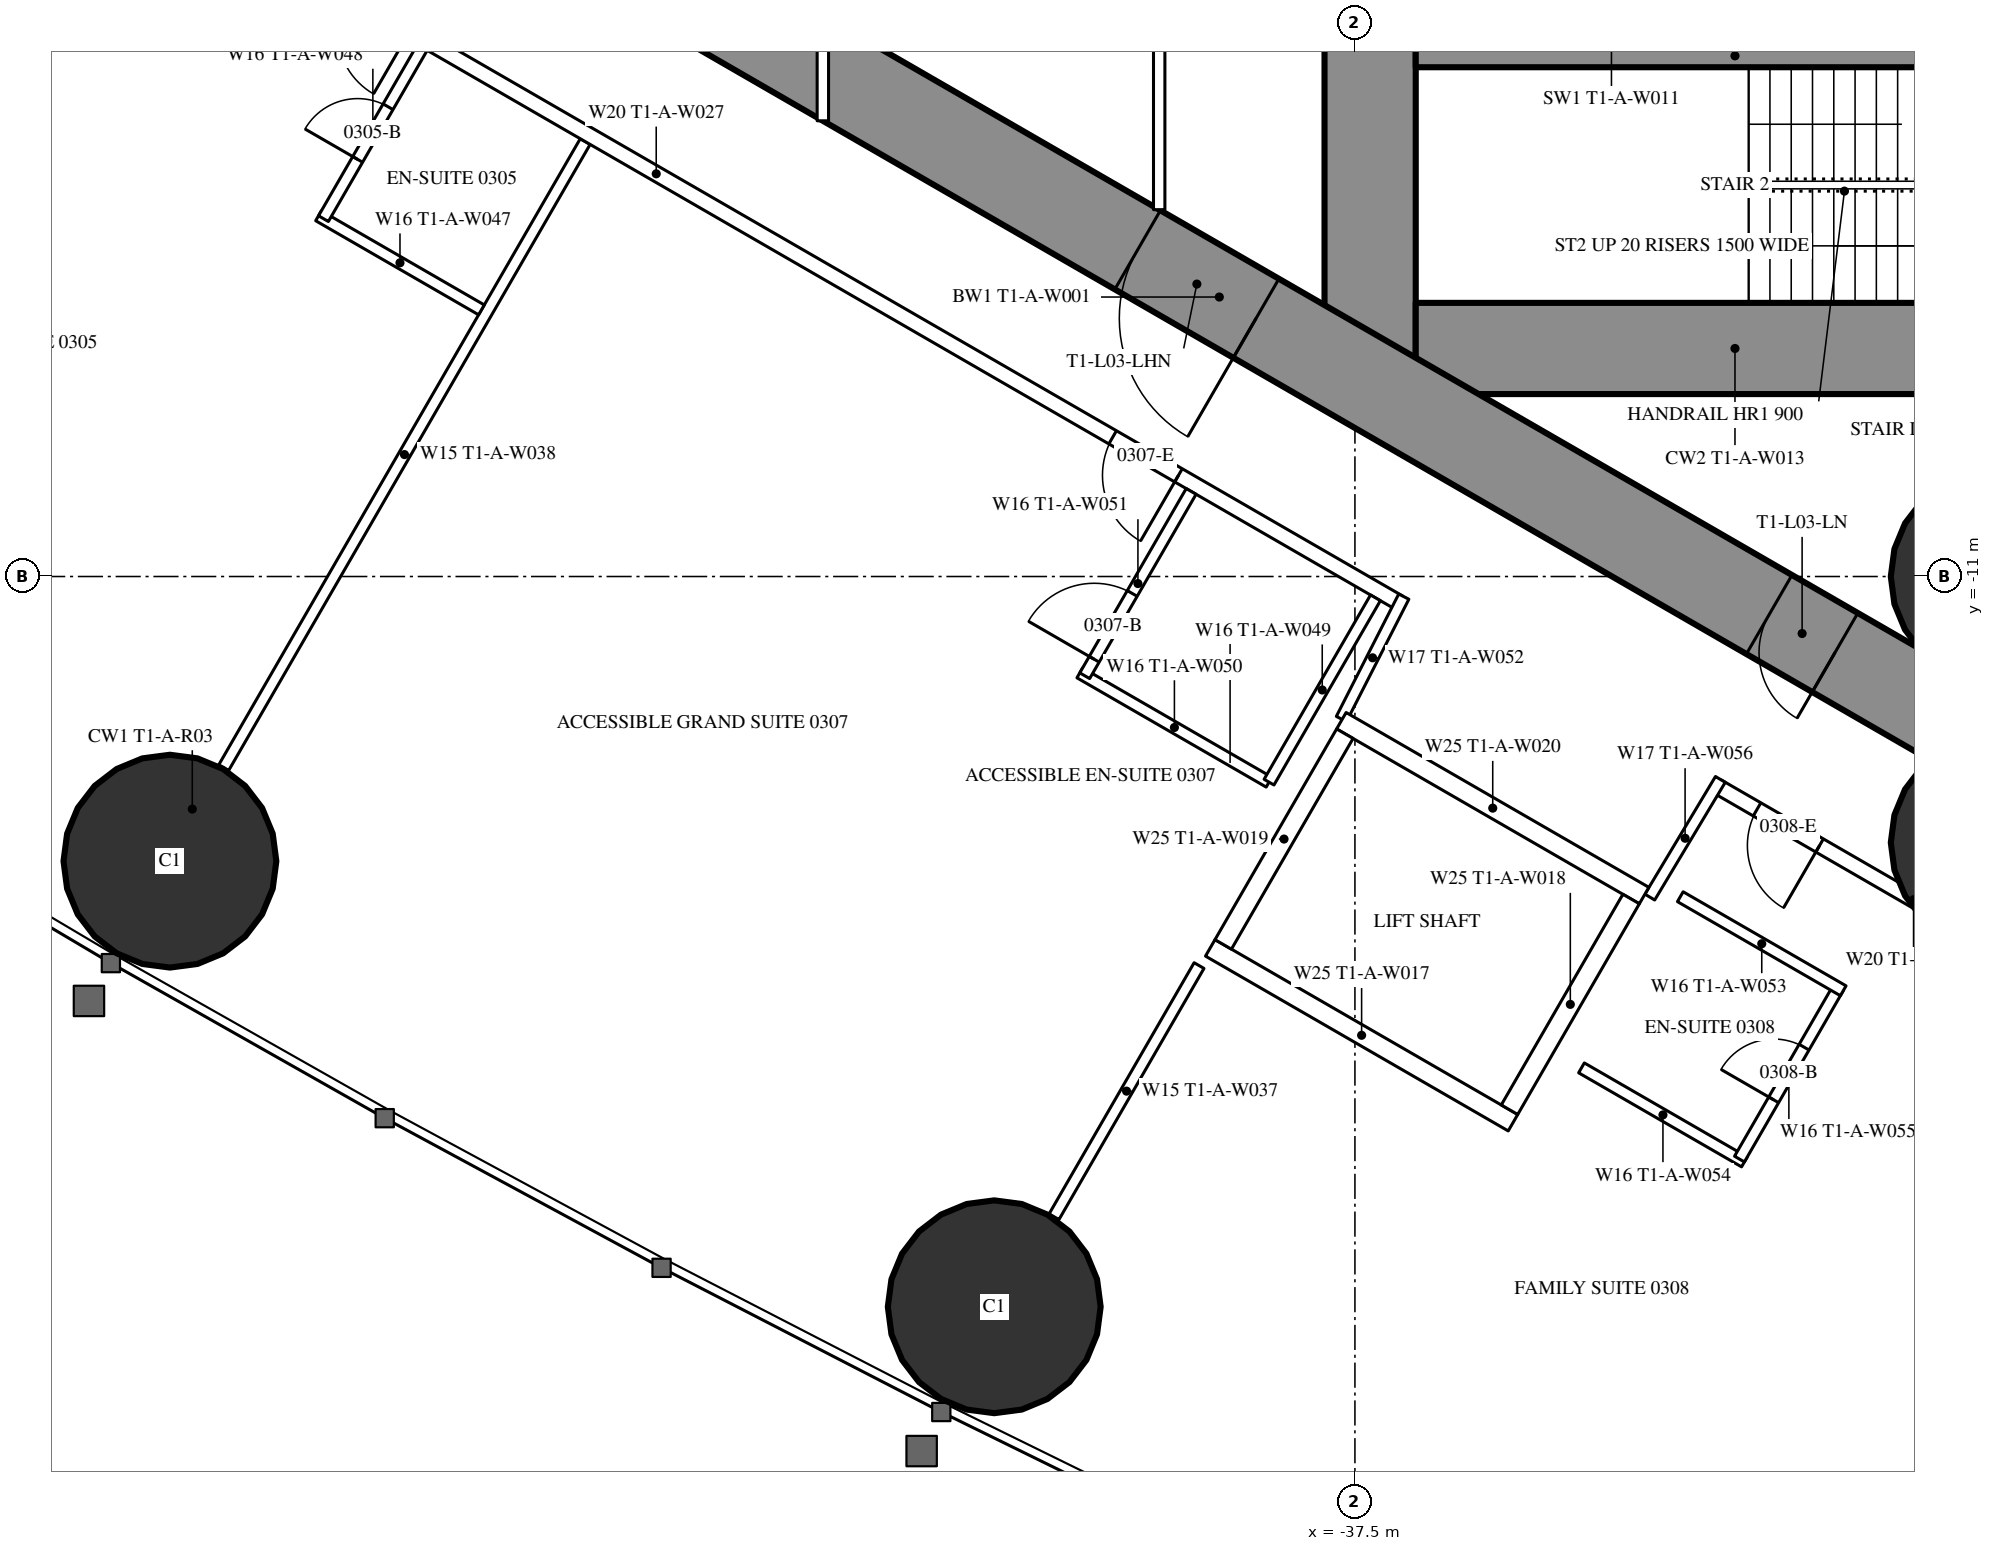
"""IFC4 building model, lengths in metres.
Left out: names, types, materials, properties, quantities, classifications, styles, units other than length and angle.
Written with IfcOpenShell. Run it as: python <this file> out.ifc"""

import sys

from ifc_helpers import new_model, si_unit, direction, frame, frame_2d, origin, origin_2d, place, context, subcontext, project, spatial, rectangle, hollow_circle, extrude, element, fill, save


model = new_model("IFC4")
c1 = context("Model", 3, precision=1e-05, world=origin(), true_north=direction((0.0, 1.0)))
c2 = subcontext(c1, "Body", "Model", "MODEL_VIEW")
j1 = project(units=[si_unit("LENGTHUNIT", "METRE"), si_unit("PLANEANGLEUNIT", "RADIAN")], contexts=[c1])
p1 = place(None, origin())
s1 = spatial("IfcSite", under=j1, at=p1, CompositionType="ELEMENT")
p2 = place(p1, origin())
s2 = spatial("IfcBuilding", under=s1, at=p2, CompositionType="ELEMENT")
p3 = place(p2, frame((0.0, 0.0, 18.0)))
s3 = spatial("IfcBuildingStorey", under=s2, at=p3, CompositionType="ELEMENT", Elevation=18.0)
for number, where, z_axis, x_axis in (
    (1, (-29.05, -11.0, 0.0), (0.0, 0.0, 1.0), (1.0, 0.0, 0.0)),
    (2, (-29.05, -14.5, 0.0), (0.0, 0.0, 1.0), (1.0, 0.0, 0.0)),
    (3, (-53.09, -14.745, 0.0), (0.0, 0.0, 1.0), (1.0, 0.0, 0.0)),
    (4, (-42.245, -20.607, 0.0), (0.0, 0.0, 1.0), (1.0, 0.0, 0.0)),
):
    element("IfcColumn", number, at=place(p3, frame(where, z_axis=z_axis, x_axis=x_axis)), inside=s3, PredefinedType="COLUMN", context=c2, shape_type="SweptSolid", body=[
        extrude(hollow_circle(Radius=1.4, WallThickness=0.12, at=origin_2d()), origin(), (0.0, 0.0, 1.0), 3.5),
    ])
p4 = place(p3, frame((-37.3, 8.6, 0.0), z_axis=(0.0, 0.0, 1.0), x_axis=(0.0, -1.0, 0.0)))
e5 = element("IfcWall", 5, at=p4, inside=s3, PredefinedType="SHEAR", context=c2, shape_type="SweptSolid", body=[
    extrude(rectangle(XDim=17.2, YDim=1.2, at=frame_2d((8.6, 0.0))), origin(), (0.0, 0.0, 1.0), 3.5),
])
p5 = place(p4, frame((7.7, 0.0, 0.0)))
e6 = element("IfcOpeningElement", 6, at=p5, cuts=e5, PredefinedType="OPENING", context=c2, shape_type="SweptSolid", body=[
    extrude(rectangle(XDim=1.8, YDim=2.2, at=frame_2d((0.9, 1.1))), frame((0.0, 0.61, 0.0), z_axis=(0.0, -1.0, 0.0), x_axis=(1.0, 0.0, 0.0)), (0.0, 0.0, 1.0), 1.22),
])
p6 = place(p3, frame((-28.3, -8.0, 0.0), z_axis=(0.0, 0.0, 1.0), x_axis=(-1.0, 0.0, 0.0)))
e7 = element("IfcWall", 7, at=p6, inside=s3, PredefinedType="SHEAR", context=c2, shape_type="SweptSolid", body=[
    extrude(rectangle(XDim=8.4, YDim=1.2, at=frame_2d((4.2, 0.0))), origin(), (0.0, 0.0, 1.0), 3.5),
])
p7 = place(p6, frame((0.25, 0.0, 0.0)))
e8 = element("IfcOpeningElement", 8, at=p7, cuts=e7, PredefinedType="OPENING", context=c2, shape_type="SweptSolid", body=[
    extrude(rectangle(XDim=1.0, YDim=2.2, at=frame_2d((0.5, 1.1))), frame((0.0, 0.61, 0.0), z_axis=(0.0, -1.0, 0.0), x_axis=(1.0, 0.0, 0.0)), (0.0, 0.0, 1.0), 1.22),
])
p8 = place(p3, frame((-28.3, -4.15, 0.0), z_axis=(0.0, 0.0, 1.0), x_axis=(-1.0, 0.0, 0.0)))
e9 = element("IfcWall", 9, at=p8, inside=s3, PredefinedType="SHEAR", context=c2, shape_type="SweptSolid", body=[
    extrude(rectangle(XDim=8.4, YDim=0.3, at=frame_2d((4.2, 0.0))), origin(), (0.0, 0.0, 1.0), 3.5),
])
p9 = place(p3, frame((-27.2, -14.3, 0.0), z_axis=(0.0, 0.0, 1.0), x_axis=(-0.866024021859, 0.500002393557, 0.0)))
e10 = element("IfcWall", 10, at=p9, inside=s3, PredefinedType="SHEAR", context=c2, shape_type="SweptSolid", body=[
    extrude(rectangle(XDim=27.907, YDim=1.2, at=frame_2d((13.954, 0.0))), origin(), (0.0, 0.0, 1.0), 3.5),
])
p10 = place(p9, frame((4.6, 0.0, 0.0)))
e11 = element("IfcOpeningElement", 11, at=p10, cuts=e10, PredefinedType="OPENING", context=c2, shape_type="SweptSolid", body=[
    extrude(rectangle(XDim=1.0, YDim=2.2, at=frame_2d((0.5, 1.1))), frame((0.0, 0.61, 0.0), z_axis=(0.0, -1.0, 0.0), x_axis=(1.0, 0.0, 0.0)), (0.0, 0.0, 1.0), 1.22),
])
p11 = place(p9, frame((13.395, 0.0, 0.0)))
e12 = element("IfcOpeningElement", 12, at=p11, cuts=e10, PredefinedType="OPENING", context=c2, shape_type="SweptSolid", body=[
    extrude(rectangle(XDim=1.8, YDim=2.2, at=frame_2d((0.9, 1.1))), frame((0.0, 0.61, 0.0), z_axis=(0.0, -1.0, 0.0), x_axis=(1.0, 0.0, 0.0)), (0.0, 0.0, 1.0), 1.22),
])
p12 = place(p3, frame((-47.627, -5.278, 0.0), z_axis=(0.0, 0.0, 1.0), x_axis=(-0.500009844318, -0.86601972009, 0.0)))
e13 = element("IfcWall", 13, at=p12, inside=s3, PredefinedType="PARTITIONING", context=c2, shape_type="SweptSolid", body=[
    extrude(rectangle(XDim=9.51, YDim=0.15, at=frame_2d((4.755, 0.0))), origin(), (0.0, 0.0, 1.0), 2.25),
])
p13 = place(p3, frame((-39.551, -16.118, 0.0), z_axis=(0.0, 0.0, 1.0), x_axis=(-0.499986503906, -0.866033195618, 0.0)))
e14 = element("IfcWall", 14, at=p13, inside=s3, PredefinedType="PARTITIONING", context=c2, shape_type="SweptSolid", body=[
    extrude(rectangle(XDim=3.815, YDim=0.15, at=frame_2d((1.907, 0.0))), origin(), (0.0, 0.0, 1.0), 3.25),
])
p14 = place(p3, frame((-27.572, -16.741, 0.0), z_axis=(0.0, 0.0, 1.0), x_axis=(-0.866024464444, 0.500001626982, 0.0)))
e15 = element("IfcWall", 15, at=p14, inside=s3, PredefinedType="PARTITIONING", context=c2, shape_type="SweptSolid", body=[
    extrude(rectangle(XDim=5.955, YDim=0.2, at=frame_2d((2.978, 0.0))), origin(), (0.0, 0.0, 1.0), 3.25),
])
p15 = place(p14, frame((4.405, 0.0, 0.0)))
e16 = element("IfcOpeningElement", 16, at=p15, cuts=e15, PredefinedType="OPENING", context=c2, shape_type="SweptSolid", body=[
    extrude(rectangle(XDim=0.95, YDim=2.2, at=frame_2d((0.475, 1.1))), frame((0.0, 0.11, 0.0), z_axis=(0.0, -1.0, 0.0), x_axis=(1.0, 0.0, 0.0)), (0.0, 0.0, 1.0), 0.22),
])
p16 = place(p3, frame((-36.92, -11.344, 0.0), z_axis=(0.0, 0.0, 1.0), x_axis=(-0.866028313256, 0.499994960614, 0.0)))
e17 = element("IfcWall", 17, at=p16, inside=s3, PredefinedType="PARTITIONING", context=c2, shape_type="SweptSolid", body=[
    extrude(rectangle(XDim=22.568, YDim=0.2, at=frame_2d((11.284, 0.0))), origin(), (0.0, 0.0, 1.0), 3.25),
])
p17 = place(p16, frame((15.03, 0.0, 0.0)))
e18 = element("IfcOpeningElement", 18, at=p17, cuts=e17, PredefinedType="OPENING", context=c2, shape_type="SweptSolid", body=[
    extrude(rectangle(XDim=0.95, YDim=2.2, at=frame_2d((0.475, 1.1))), frame((0.0, 0.11, 0.0), z_axis=(0.0, -1.0, 0.0), x_axis=(1.0, 0.0, 0.0)), (0.0, 0.0, 1.0), 0.22),
])
p18 = place(p16, frame((3.35, 0.0, 0.0)))
e19 = element("IfcOpeningElement", 19, at=p18, cuts=e17, PredefinedType="OPENING", context=c2, shape_type="SweptSolid", body=[
    extrude(rectangle(XDim=1.0, YDim=2.2, at=frame_2d((0.5, 1.1))), frame((0.0, 0.11, 0.0), z_axis=(0.0, -1.0, 0.0), x_axis=(1.0, 0.0, 0.0)), (0.0, 0.0, 1.0), 0.22),
])
p19 = place(p3, frame((-36.857, -11.265, 0.0), z_axis=(0.0, 0.0, 1.0), x_axis=(-0.454225294761, -0.890886851176, 0.0)))
e20 = element("IfcWall", 20, at=p19, inside=s3, PredefinedType="PARTITIONING", context=c2, shape_type="SweptSolid", body=[
    extrude(rectangle(XDim=1.807, YDim=0.15, at=frame_2d((0.904, 0.0))), origin(), (0.0, 0.0, 1.0), 3.25),
])
p20 = place(p3, frame((-33.621, -15.218, 0.0), z_axis=(0.0, 0.0, 1.0), x_axis=(0.514336634837, 0.857588377991, 0.0)))
e21 = element("IfcWall", 21, at=p20, inside=s3, PredefinedType="PARTITIONING", context=c2, shape_type="SweptSolid", body=[
    extrude(rectangle(XDim=1.805, YDim=0.15, at=frame_2d((0.903, 0.0))), origin(), (0.0, 0.0, 1.0), 3.25),
])
p21 = place(p3, frame((-48.992, -7.492, 0.0), z_axis=(0.0, 0.0, 1.0), x_axis=(-0.866031185235, 0.4999899861, 0.0)))
e22 = element("IfcWall", 22, at=p21, inside=s3, PredefinedType="PARTITIONING", context=c2, shape_type="SweptSolid", body=[
    extrude(rectangle(XDim=2.475, YDim=0.15, at=frame_2d((1.238, 0.0))), origin(), (0.0, 0.0, 1.0), 3.25),
])
p22 = place(p3, frame((-49.77, -4.04, 0.0), z_axis=(0.0, 0.0, 1.0), x_axis=(-0.500006934395, -0.866021400173, 0.0)))
e23 = element("IfcWall", 23, at=p22, inside=s3, PredefinedType="PARTITIONING", context=c2, shape_type="SweptSolid", body=[
    extrude(rectangle(XDim=2.6, YDim=0.15, at=frame_2d((1.3, 0.0))), origin(), (0.0, 0.0, 1.0), 3.25),
])
p23 = place(p22, frame((0.9, 0.0, 0.0)))
e24 = element("IfcOpeningElement", 24, at=p23, cuts=e23, PredefinedType="OPENING", context=c2, shape_type="SweptSolid", body=[
    extrude(rectangle(XDim=0.8, YDim=2.2, at=frame_2d((0.4, 1.1))), frame((0.0, 0.085, 0.0), z_axis=(0.0, -1.0, 0.0), x_axis=(1.0, 0.0, 0.0)), (0.0, 0.0, 1.0), 0.17),
])
p24 = place(p3, frame((-38.63, -13.705, 0.0), z_axis=(0.0, 0.0, 1.0), x_axis=(-0.866018712932, 0.500011588718, 0.0)))
e25 = element("IfcWall", 25, at=p24, inside=s3, PredefinedType="PARTITIONING", context=c2, shape_type="SweptSolid", body=[
    extrude(rectangle(XDim=2.875, YDim=0.15, at=frame_2d((1.438, 0.0))), origin(), (0.0, 0.0, 1.0), 3.25),
])
p25 = place(p3, frame((-39.655, -9.88, 0.0), z_axis=(0.0, 0.0, 1.0), x_axis=(-0.500049511043, -0.865996816683, 0.0)))
e26 = element("IfcWall", 26, at=p25, inside=s3, PredefinedType="PARTITIONING", context=c2, shape_type="SweptSolid", body=[
    extrude(rectangle(XDim=2.8, YDim=0.15, at=frame_2d((1.4, 0.0))), origin(), (0.0, 0.0, 1.0), 3.25),
])
p26 = place(p25, frame((1.55, 0.0, 0.0)))
e27 = element("IfcOpeningElement", 27, at=p26, cuts=e26, PredefinedType="OPENING", context=c2, shape_type="SweptSolid", body=[
    extrude(rectangle(XDim=1.0, YDim=2.2, at=frame_2d((0.5, 1.1))), frame((0.0, 0.085, 0.0), z_axis=(0.0, -1.0, 0.0), x_axis=(1.0, 0.0, 0.0)), (0.0, 0.0, 1.0), 0.17),
])
p27 = place(p3, frame((-37.23, -11.281, 0.0), z_axis=(0.0, 0.0, 1.0), x_axis=(-0.500049511043, -0.865996816683, 0.0)))
e28 = element("IfcWall", 28, at=p27, inside=s3, PredefinedType="PARTITIONING", context=c2, shape_type="SweptSolid", body=[
    extrude(rectangle(XDim=2.8, YDim=0.15, at=frame_2d((1.4, 0.0))), origin(), (0.0, 0.0, 1.0), 3.25),
])
p28 = place(p3, frame((-32.376, -18.702, 0.0), z_axis=(0.0, 0.0, 1.0), x_axis=(-0.866006523861, 0.500032699561, 0.0)))
e29 = element("IfcWall", 29, at=p28, inside=s3, PredefinedType="PARTITIONING", context=c2, shape_type="SweptSolid", body=[
    extrude(rectangle(XDim=2.475, YDim=0.15, at=frame_2d((1.237, 0.0))), origin(), (0.0, 0.0, 1.0), 3.25),
])
p29 = place(p3, frame((-31.141, -16.413, 0.0), z_axis=(0.0, 0.0, 1.0), x_axis=(-0.500006934395, -0.866021400173, 0.0)))
e30 = element("IfcWall", 30, at=p29, inside=s3, PredefinedType="PARTITIONING", context=c2, shape_type="SweptSolid", body=[
    extrude(rectangle(XDim=2.6, YDim=0.15, at=frame_2d((1.3, 0.0))), origin(), (0.0, 0.0, 1.0), 3.25),
])
p30 = place(p29, frame((0.9, 0.0, 0.0)))
e31 = element("IfcOpeningElement", 31, at=p30, cuts=e30, PredefinedType="OPENING", context=c2, shape_type="SweptSolid", body=[
    extrude(rectangle(XDim=0.8, YDim=2.2, at=frame_2d((0.4, 1.1))), frame((0.0, 0.085, 0.0), z_axis=(0.0, -1.0, 0.0), x_axis=(1.0, 0.0, 0.0)), (0.0, 0.0, 1.0), 0.17),
])
p31 = place(p3, frame((-31.076, -16.45, 0.0), z_axis=(0.0, 0.0, 1.0), x_axis=(-0.866073894602, 0.499916002032, 0.0)))
e32 = element("IfcWall", 32, at=p31, inside=s3, PredefinedType="PARTITIONING", context=c2, shape_type="SweptSolid", body=[
    extrude(rectangle(XDim=2.475, YDim=0.15, at=frame_2d((1.238, 0.0))), origin(), (0.0, 0.0, 1.0), 3.25),
])
p32 = place(p3, frame((-40.075, 1.2, 0.0), z_axis=(0.0, 0.0, 1.0), x_axis=(0.0, -1.0, 0.0)))
e33 = element("IfcWall", 33, at=p32, inside=s3, PredefinedType="PARTITIONING", context=c2, shape_type="SweptSolid", body=[
    extrude(rectangle(XDim=7.374, YDim=0.15, at=frame_2d((3.687, 0.0))), origin(), (0.0, 0.0, 1.0), 3.25),
])
p33 = place(p32, frame((2.787, 0.0, 0.0)))
e34 = element("IfcOpeningElement", 34, at=p33, cuts=e33, PredefinedType="OPENING", context=c2, shape_type="SweptSolid", body=[
    extrude(rectangle(XDim=1.8, YDim=2.2, at=frame_2d((0.9, 1.1))), frame((0.0, 0.085, 0.0), z_axis=(0.0, -1.0, 0.0), x_axis=(1.0, 0.0, 0.0)), (0.0, 0.0, 1.0), 0.17),
])
p34 = place(p3, frame((-44.5, 5.005, 0.0), z_axis=(0.0, 0.0, 1.0), x_axis=(0.0, -1.0, 0.0)))
e35 = element("IfcWall", 35, at=p34, inside=s3, PredefinedType="PARTITIONING", context=c2, shape_type="SweptSolid", body=[
    extrude(rectangle(XDim=10.009, YDim=0.15, at=frame_2d((5.005, 0.0))), origin(), (0.0, 0.0, 1.0), 2.35),
])
p35 = place(p34, frame((2.002, 0.0, 0.0)))
e36 = element("IfcOpeningElement", 36, at=p35, cuts=e35, PredefinedType="OPENING", context=c2, shape_type="SweptSolid", body=[
    extrude(rectangle(XDim=1.0, YDim=2.2, at=frame_2d((0.5, 1.1))), frame((0.0, 0.085, 0.0), z_axis=(0.0, -1.0, 0.0), x_axis=(1.0, 0.0, 0.0)), (0.0, 0.0, 1.0), 0.17),
])
p36 = place(p34, frame((7.007, 0.0, 0.0)))
e37 = element("IfcOpeningElement", 37, at=p36, cuts=e35, PredefinedType="OPENING", context=c2, shape_type="SweptSolid", body=[
    extrude(rectangle(XDim=1.0, YDim=2.2, at=frame_2d((0.5, 1.1))), frame((0.0, 0.085, 0.0), z_axis=(0.0, -1.0, 0.0), x_axis=(1.0, 0.0, 0.0)), (0.0, 0.0, 1.0), 0.17),
])
p37 = place(p3, frame((-33.696, -15.197, 0.0), z_axis=(0.0, 0.0, 1.0), x_axis=(-0.865976953817, 0.500083908417, 0.0)))
e38 = element("IfcWall", 38, at=p37, inside=s3, PredefinedType="PARTITIONING", context=c2, shape_type="SweptSolid", body=[
    extrude(rectangle(XDim=4.599, YDim=0.25, at=frame_2d((2.3, 0.0))), origin(), (0.0, 0.0, 1.0), 3.25),
])
p38 = place(p3, frame((-35.42, -18.186, 0.0), z_axis=(0.0, 0.0, 1.0), x_axis=(-0.865990227814, 0.50006092162, 0.0)))
e39 = element("IfcWall", 39, at=p38, inside=s3, PredefinedType="PARTITIONING", context=c2, shape_type="SweptSolid", body=[
    extrude(rectangle(XDim=4.6, YDim=0.25, at=frame_2d((2.3, 0.0))), origin(), (0.0, 0.0, 1.0), 3.25),
])
p39 = place(p3, frame((-33.866, -15.243, 0.0), z_axis=(0.0, 0.0, 1.0), x_axis=(-0.499929347863, -0.866066190972, 0.0)))
e40 = element("IfcWall", 40, at=p39, inside=s3, PredefinedType="PARTITIONING", context=c2, shape_type="SweptSolid", body=[
    extrude(rectangle(XDim=3.201, YDim=0.25, at=frame_2d((1.6, 0.0))), origin(), (0.0, 0.0, 1.0), 3.25),
])
p40 = place(p3, frame((-37.633, -13.068, 0.0), z_axis=(0.0, 0.0, 1.0), x_axis=(-0.499872130319, -0.866099216793, 0.0)))
e41 = element("IfcWall", 41, at=p40, inside=s3, PredefinedType="PARTITIONING", context=c2, shape_type="SweptSolid", body=[
    extrude(rectangle(XDim=3.2, YDim=0.25, at=frame_2d((1.6, 0.0))), origin(), (0.0, 0.0, 1.0), 3.25),
])
p41 = place(p23, origin())
e42 = element("IfcDoor", 42, at=p41, inside=s3, OperationType="SINGLE_SWING_RIGHT", PredefinedType="DOOR", context=c2, shape_type="SweptSolid", body=[
    extrude(rectangle(XDim=0.8, YDim=2.2, at=frame_2d((0.4, 1.1))), frame((0.0, 0.025, 0.0), z_axis=(0.0, -1.0, 0.0), x_axis=(1.0, 0.0, 0.0)), (0.0, 0.0, 1.0), 0.05),
])
fill(e24, e42)
p42 = place(p26, origin())
e43 = element("IfcDoor", 43, at=p42, inside=s3, OperationType="SINGLE_SWING_RIGHT", PredefinedType="DOOR", context=c2, shape_type="SweptSolid", body=[
    extrude(rectangle(XDim=1.0, YDim=2.2, at=frame_2d((0.5, 1.1))), frame((0.0, 0.025, 0.0), z_axis=(0.0, -1.0, 0.0), x_axis=(1.0, 0.0, 0.0)), (0.0, 0.0, 1.0), 0.05),
])
fill(e27, e43)
p43 = place(p18, origin())
e44 = element("IfcDoor", 44, at=p43, inside=s3, OperationType="SINGLE_SWING_LEFT", PredefinedType="DOOR", context=c2, shape_type="SweptSolid", body=[
    extrude(rectangle(XDim=1.0, YDim=2.2, at=frame_2d((0.5, 1.1))), frame((0.0, 0.025, 0.0), z_axis=(0.0, -1.0, 0.0), x_axis=(1.0, 0.0, 0.0)), (0.0, 0.0, 1.0), 0.05),
])
fill(e19, e44)
p44 = place(p30, origin())
e45 = element("IfcDoor", 45, at=p44, inside=s3, OperationType="SINGLE_SWING_RIGHT", PredefinedType="DOOR", context=c2, shape_type="SweptSolid", body=[
    extrude(rectangle(XDim=0.8, YDim=2.2, at=frame_2d((0.4, 1.1))), frame((0.0, 0.025, 0.0), z_axis=(0.0, -1.0, 0.0), x_axis=(1.0, 0.0, 0.0)), (0.0, 0.0, 1.0), 0.05),
])
fill(e31, e45)
p45 = place(p15, origin())
e46 = element("IfcDoor", 46, at=p45, inside=s3, OperationType="SINGLE_SWING_LEFT", PredefinedType="DOOR", context=c2, shape_type="SweptSolid", body=[
    extrude(rectangle(XDim=0.95, YDim=2.2, at=frame_2d((0.475, 1.1))), frame((0.0, 0.025, 0.0), z_axis=(0.0, -1.0, 0.0), x_axis=(1.0, 0.0, 0.0)), (0.0, 0.0, 1.0), 0.05),
])
fill(e16, e46)
p46 = place(p10, origin())
e47 = element("IfcDoor", 47, at=p46, inside=s3, OperationType="SINGLE_SWING_LEFT", PredefinedType="DOOR", context=c2, shape_type="SweptSolid", body=[
    extrude(rectangle(XDim=1.0, YDim=2.2, at=frame_2d((0.5, 1.1))), frame((0.0, 0.025, 0.0), z_axis=(0.0, -1.0, 0.0), x_axis=(1.0, 0.0, 0.0)), (0.0, 0.0, 1.0), 0.05),
])
fill(e11, e47)
p47 = place(p11, origin())
e48 = element("IfcDoor", 48, at=p47, inside=s3, OperationType="DOUBLE_DOOR_SINGLE_SWING", PredefinedType="DOOR", context=c2, shape_type="SweptSolid", body=[
    extrude(rectangle(XDim=1.8, YDim=2.2, at=frame_2d((0.9, 1.1))), frame((0.0, 0.025, 0.0), z_axis=(0.0, -1.0, 0.0), x_axis=(1.0, 0.0, 0.0)), (0.0, 0.0, 1.0), 0.05),
])
fill(e12, e48)
save(model, sys.argv[1])
